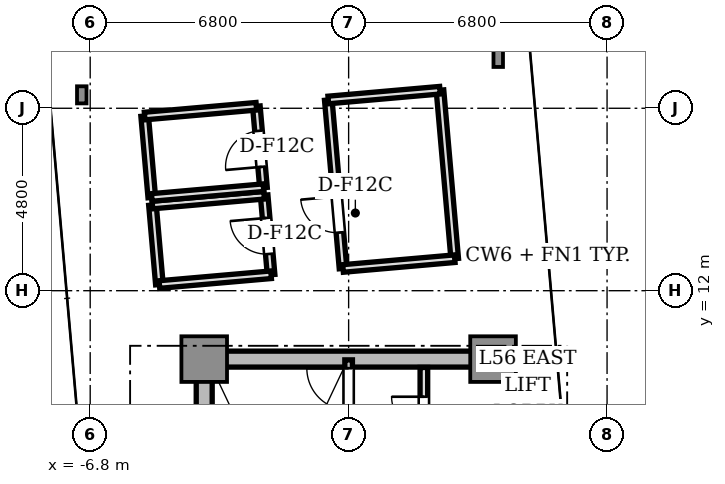
"""IFC4 building model, lengths in metres.
Left out: names, types, materials, properties, quantities, classifications, styles, units other than length and angle.
Written with IfcOpenShell. Run it as: python <this file> out.ifc"""

import sys

from ifc_helpers import new_model, si_unit, direction, frame, frame_2d, origin, origin_2d, place, context, subcontext, project, spatial, rectangle, i_section, extrude, source, transform, mapped, element, fill, save


model = new_model("IFC4")
c1 = context("Model", 3, precision=1e-05, world=origin(), true_north=direction((0.0, 1.0)))
c2 = subcontext(c1, "Body", "Model", "MODEL_VIEW")
j1 = project(units=[si_unit("LENGTHUNIT", "METRE"), si_unit("PLANEANGLEUNIT", "RADIAN")], contexts=[c1])
p1 = place(None, origin())
s1 = spatial("IfcSite", under=j1, at=p1, CompositionType="ELEMENT")
p2 = place(p1, origin())
s2 = spatial("IfcBuilding", under=s1, at=p2, CompositionType="ELEMENT")
p3 = place(p2, frame((0.0, 0.0, 202.0)))
s3 = spatial("IfcBuildingStorey", under=s2, at=p3, CompositionType="ELEMENT", Elevation=202.0)
p4 = place(p3, frame((-3.55, 10.2, 0.0), z_axis=(0.0, 0.0, 1.0), x_axis=(1.0, 0.0, 0.0)))
e1 = element("IfcWall", 1, at=p4, inside=s3, PredefinedType="SHEAR", context=c2, shape_type="SweptSolid", body=[
    extrude(rectangle(XDim=7.1, YDim=0.42, at=frame_2d((3.55, 0.0))), origin(), (0.0, 0.0, 1.0), 4.26),
])
p5 = place(p3, frame((-3.8, 2.85, 0.0), z_axis=(0.0, 0.0, 1.0), x_axis=(0.0, 1.0, 0.0)))
e2 = element("IfcWall", 2, at=p5, inside=s3, PredefinedType="SHEAR", context=c2, shape_type="SweptSolid", body=[
    extrude(rectangle(XDim=6.9, YDim=0.42, at=frame_2d((3.45, 0.0))), origin(), (0.0, 0.0, 1.0), 4.26),
])
m1 = source(origin(), c2, "Body", "SweptSolid", [
    extrude(rectangle(XDim=1.2, YDim=1.2, at=origin_2d()), origin(), (0.0, 0.0, 1.0), 4.26),
])
for number, where, z_axis, x_axis in (
    (3, (-3.8, 10.2, 0.0), (0.0, 0.0, 1.0), (1.0, 0.0, 0.0)),
    (4, (3.8, 10.2, 0.0), (0.0, 0.0, 1.0), (1.0, 0.0, 0.0)),
):
    element("IfcColumn", number, at=place(p3, frame(where, z_axis=z_axis, x_axis=x_axis)), inside=s3, PredefinedType="COLUMN", context=c2, shape_type="MappedRepresentation", body=[
        mapped(m1, transform((0.0, 0.0, 0.0), scale=1.0)),
    ])
m2 = source(origin(), c2, "Body", "SweptSolid", [
    extrude(i_section(OverallWidth=0.25, OverallDepth=0.45, WebThickness=0.014, FlangeThickness=0.014, FilletRadius=0.015, at=origin_2d()), origin(), (0.0, 0.0, 1.0), 4.26),
])
for number, where, z_axis, x_axis in (
    (5, (3.936, 18.112, 0.0), (0.0, 0.0, 1.0), (1.0, 0.0, 0.0)),
    (6, (-7.022, 17.153, 0.0), (0.0, 0.0, 1.0), (1.0, 0.0, 0.0)),
):
    element("IfcColumn", number, at=place(p3, frame(where, z_axis=z_axis, x_axis=x_axis)), inside=s3, PredefinedType="COLUMN", context=c2, shape_type="MappedRepresentation", body=[
        mapped(m2, transform((0.0, 0.0, 0.0), scale=1.0)),
    ])
p6 = place(p3, frame((0.0, 2.5, 0.0), z_axis=(0.0, 0.0, 1.0), x_axis=(0.0, 1.0, 0.0)))
e7 = element("IfcWall", 7, at=p6, inside=s3, PredefinedType="SOLIDWALL", context=c2, shape_type="SweptSolid", body=[
    extrude(rectangle(XDim=7.68, YDim=0.2, at=frame_2d((3.84, 0.0))), origin(), (0.0, 0.0, 1.0), 4.26),
])
p7 = place(p6, frame((6.36, 0.0, 0.0)))
e8 = element("IfcOpeningElement", 8, at=p7, cuts=e7, PredefinedType="OPENING", context=c2, shape_type="SweptSolid", body=[
    extrude(rectangle(XDim=1.1, YDim=2.15, at=frame_2d((0.55, 1.075))), frame((0.0, 0.11, 0.0), z_axis=(0.0, -1.0, 0.0), x_axis=(1.0, 0.0, 0.0)), (0.0, 0.0, 1.0), 0.22),
])
p8 = place(p3, frame((1.98, 5.32, 0.0), z_axis=(0.0, 0.0, 1.0), x_axis=(0.0, 1.0, 0.0)))
e9 = element("IfcWall", 9, at=p8, inside=s3, PredefinedType="SOLIDWALL", context=c2, shape_type="SweptSolid", body=[
    extrude(rectangle(XDim=4.66, YDim=0.2, at=frame_2d((2.33, 0.0))), origin(), (0.0, 0.0, 1.0), 3.81),
])
p9 = place(p8, frame((3.04, 0.0, 0.0)))
e10 = element("IfcOpeningElement", 10, at=p9, cuts=e9, PredefinedType="OPENING", context=c2, shape_type="SweptSolid", body=[
    extrude(rectangle(XDim=0.85, YDim=2.1, at=frame_2d((0.425, 1.05))), frame((0.0, 0.11, 0.0), z_axis=(0.0, -1.0, 0.0), x_axis=(1.0, 0.0, 0.0)), (0.0, 0.0, 1.0), 0.22),
])
p10 = place(p3, frame((-2.04, 12.419, 0.0), z_axis=(0.0, 0.0, 1.0), x_axis=(-0.08707609357, 0.996201663283, 0.0)))
e11 = element("IfcWall", 11, at=p10, inside=s3, PredefinedType="SOLIDWALL", context=c2, shape_type="SweptSolid", body=[
    extrude(rectangle(XDim=2.1, YDim=0.2, at=frame_2d((1.05, 0.0))), origin(), (0.0, 0.0, 1.0), 3.81),
])
p11 = place(p10, frame((0.55, 0.0, 0.0)))
e12 = element("IfcOpeningElement", 12, at=p11, cuts=e11, PredefinedType="OPENING", context=c2, shape_type="SweptSolid", body=[
    extrude(rectangle(XDim=0.95, YDim=2.15, at=frame_2d((0.475, 1.075))), frame((0.0, 0.11, 0.0), z_axis=(0.0, -1.0, 0.0), x_axis=(1.0, 0.0, 0.0)), (0.0, 0.0, 1.0), 0.22),
])
p12 = place(p3, frame((-4.979, 12.162, 0.0), z_axis=(0.0, 0.0, 1.0), x_axis=(-0.087191466799, 0.996191571997, 0.0)))
e13 = element("IfcWall", 13, at=p12, inside=s3, PredefinedType="SOLIDWALL", context=c2, shape_type="SweptSolid", body=[
    extrude(rectangle(XDim=2.1, YDim=0.2, at=frame_2d((1.05, 0.0))), origin(), (0.0, 0.0, 1.0), 2.73),
])
p13 = place(p3, frame((-2.04, 12.419, 0.0), z_axis=(0.0, 0.0, 1.0), x_axis=(-0.996195424117, -0.087147443848, 0.0)))
e14 = element("IfcWall", 14, at=p13, inside=s3, PredefinedType="SOLIDWALL", context=c2, shape_type="SweptSolid", body=[
    extrude(rectangle(XDim=2.95, YDim=0.2, at=frame_2d((1.475, 0.0))), origin(), (0.0, 0.0, 1.0), 3.81),
])
p14 = place(p3, frame((-2.223, 14.511, 0.0), z_axis=(0.0, 0.0, 1.0), x_axis=(-0.996196052583, -0.087140259459, 0.0)))
e15 = element("IfcWall", 15, at=p14, inside=s3, PredefinedType="SOLIDWALL", context=c2, shape_type="SweptSolid", body=[
    extrude(rectangle(XDim=2.95, YDim=0.2, at=frame_2d((1.475, 0.0))), origin(), (0.0, 0.0, 1.0), 2.73),
])
p15 = place(p3, frame((-2.24, 14.711, 0.0), z_axis=(0.0, 0.0, 1.0), x_axis=(-0.087207799987, 0.996190142303, 0.0)))
e16 = element("IfcWall", 16, at=p15, inside=s3, PredefinedType="SOLIDWALL", context=c2, shape_type="SweptSolid", body=[
    extrude(rectangle(XDim=2.15, YDim=0.2, at=frame_2d((1.075, 0.0))), origin(), (0.0, 0.0, 1.0), 3.81),
])
p16 = place(p15, frame((0.55, 0.0, 0.0)))
e17 = element("IfcOpeningElement", 17, at=p16, cuts=e16, PredefinedType="OPENING", context=c2, shape_type="SweptSolid", body=[
    extrude(rectangle(XDim=0.95, YDim=2.15, at=frame_2d((0.475, 1.075))), frame((0.0, 0.11, 0.0), z_axis=(0.0, -1.0, 0.0), x_axis=(1.0, 0.0, 0.0)), (0.0, 0.0, 1.0), 0.22),
])
p17 = place(p3, frame((-5.179, 14.454, 0.0), z_axis=(0.0, 0.0, 1.0), x_axis=(-0.087095110076, 0.996200000904, 0.0)))
e18 = element("IfcWall", 18, at=p17, inside=s3, PredefinedType="SOLIDWALL", context=c2, shape_type="SweptSolid", body=[
    extrude(rectangle(XDim=2.15, YDim=0.2, at=frame_2d((1.075, 0.0))), origin(), (0.0, 0.0, 1.0), 2.73),
])
p18 = place(p3, frame((-2.24, 14.711, 0.0), z_axis=(0.0, 0.0, 1.0), x_axis=(-0.996196052583, -0.087140259459, 0.0)))
e19 = element("IfcWall", 19, at=p18, inside=s3, PredefinedType="SOLIDWALL", context=c2, shape_type="SweptSolid", body=[
    extrude(rectangle(XDim=2.95, YDim=0.2, at=frame_2d((1.475, 0.0))), origin(), (0.0, 0.0, 1.0), 2.73),
])
p19 = place(p3, frame((-2.428, 16.853, 0.0), z_axis=(0.0, 0.0, 1.0), x_axis=(-0.996195424117, -0.087147443848, 0.0)))
e20 = element("IfcWall", 20, at=p19, inside=s3, PredefinedType="SOLIDWALL", context=c2, shape_type="SweptSolid", body=[
    extrude(rectangle(XDim=2.95, YDim=0.2, at=frame_2d((1.475, 0.0))), origin(), (0.0, 0.0, 1.0), 2.73),
])
p20 = place(p3, frame((-0.147, 12.585, 0.0), z_axis=(0.0, 0.0, 1.0), x_axis=(-0.087176478262, 0.996192883752, 0.0)))
e21 = element("IfcWall", 21, at=p20, inside=s3, PredefinedType="SOLIDWALL", context=c2, shape_type="SweptSolid", body=[
    extrude(rectangle(XDim=4.45, YDim=0.2, at=frame_2d((2.225, 0.0))), origin(), (0.0, 0.0, 1.0), 3.81),
])
p21 = place(p20, frame((0.95, 0.0, 0.0)))
e22 = element("IfcOpeningElement", 22, at=p21, cuts=e21, PredefinedType="OPENING", context=c2, shape_type="SweptSolid", body=[
    extrude(rectangle(XDim=0.95, YDim=2.15, at=frame_2d((0.475, 1.075))), frame((0.0, 0.11, 0.0), z_axis=(0.0, -1.0, 0.0), x_axis=(1.0, 0.0, 0.0)), (0.0, 0.0, 1.0), 0.22),
])
p22 = place(p3, frame((2.792, 12.842, 0.0), z_axis=(0.0, 0.0, 1.0), x_axis=(-0.087181243031, 0.996192466777, 0.0)))
e23 = element("IfcWall", 23, at=p22, inside=s3, PredefinedType="SOLIDWALL", context=c2, shape_type="SweptSolid", body=[
    extrude(rectangle(XDim=4.45, YDim=0.2, at=frame_2d((2.225, 0.0))), origin(), (0.0, 0.0, 1.0), 3.81),
])
p23 = place(p3, frame((2.792, 12.842, 0.0), z_axis=(0.0, 0.0, 1.0), x_axis=(-0.996188865451, -0.087222384465, 0.0)))
e24 = element("IfcWall", 24, at=p23, inside=s3, PredefinedType="SOLIDWALL", context=c2, shape_type="SweptSolid", body=[
    extrude(rectangle(XDim=2.95, YDim=0.2, at=frame_2d((1.475, 0.0))), origin(), (0.0, 0.0, 1.0), 3.81),
])
p24 = place(p3, frame((2.404, 17.275, 0.0), z_axis=(0.0, 0.0, 1.0), x_axis=(-0.996196052583, -0.087140259459, 0.0)))
e25 = element("IfcWall", 25, at=p24, inside=s3, PredefinedType="SOLIDWALL", context=c2, shape_type="SweptSolid", body=[
    extrude(rectangle(XDim=2.95, YDim=0.2, at=frame_2d((1.475, 0.0))), origin(), (0.0, 0.0, 1.0), 2.73),
])
m3 = source(origin(), c2, "Body", "SweptSolid", [
    extrude(rectangle(XDim=1.1, YDim=0.05, at=origin_2d()), origin(), (0.0, 0.0, 1.0), 2.15),
])
p25 = place(p7, frame((0.55, 0.0, 0.0)))
e26 = element("IfcDoor", 26, at=p25, inside=s3, OperationType="SINGLE_SWING_RIGHT", PredefinedType="DOOR", context=c2, shape_type="MappedRepresentation", body=[
    mapped(m3, transform((0.0, 0.0, 0.0), scale=1.0)),
])
fill(e8, e26)
m4 = source(origin(), c2, "Body", "SweptSolid", [
    extrude(rectangle(XDim=0.85, YDim=0.05, at=origin_2d()), origin(), (0.0, 0.0, 1.0), 2.1),
])
p26 = place(p9, frame((0.425, 0.0, 0.0)))
e27 = element("IfcDoor", 27, at=p26, inside=s3, OperationType="SINGLE_SWING_RIGHT", PredefinedType="DOOR", context=c2, shape_type="MappedRepresentation", body=[
    mapped(m4, transform((0.0, 0.0, 0.0), scale=1.0)),
])
fill(e10, e27)
m5 = source(origin(), c2, "Body", "SweptSolid", [
    extrude(rectangle(XDim=0.95, YDim=0.05, at=origin_2d()), origin(), (0.0, 0.0, 1.0), 2.15),
])
p27 = place(p11, frame((0.475, 0.0, 0.0)))
e28 = element("IfcDoor", 28, at=p27, inside=s3, OperationType="SINGLE_SWING_RIGHT", PredefinedType="DOOR", context=c2, shape_type="MappedRepresentation", body=[
    mapped(m5, transform((0.0, 0.0, 0.0), scale=1.0)),
])
fill(e12, e28)
p28 = place(p16, frame((0.475, 0.0, 0.0)))
e29 = element("IfcDoor", 29, at=p28, inside=s3, OperationType="SINGLE_SWING_LEFT", PredefinedType="DOOR", context=c2, shape_type="MappedRepresentation", body=[
    mapped(m5, transform((0.0, 0.0, 0.0), scale=1.0)),
])
fill(e17, e29)
p29 = place(p21, frame((0.475, 0.0, 0.0)))
e30 = element("IfcDoor", 30, at=p29, inside=s3, OperationType="SINGLE_SWING_RIGHT", PredefinedType="DOOR", context=c2, shape_type="MappedRepresentation", body=[
    mapped(m5, transform((0.0, 0.0, 0.0), scale=1.0)),
])
fill(e22, e30)
save(model, sys.argv[1])
